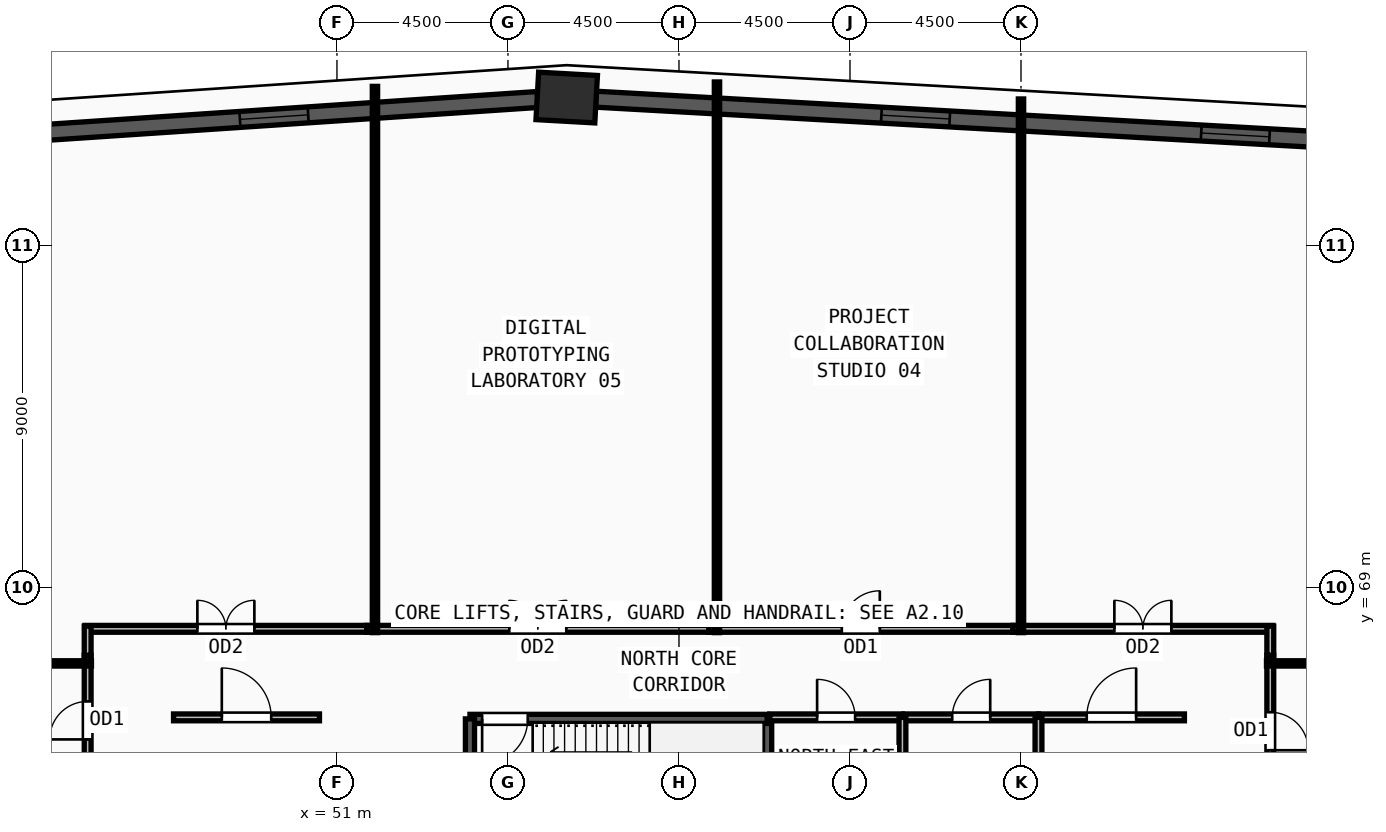
"""IFC4 building model, lengths in metres.
Left out: names, types, materials, properties, quantities, classifications, styles, units other than length and angle.
Written with IfcOpenShell. Run it as: python <this file> out.ifc"""

import sys

from ifc_helpers import new_model, si_unit, direction, frame, frame_2d, origin, origin_2d, place, context, subcontext, project, spatial, rectangle, extrude, source, transform, mapped, element, fill, save


model = new_model("IFC4")
c1 = context("Model", 3, precision=1e-05, world=origin(), true_north=direction((0.0, 1.0)))
c2 = subcontext(c1, "Body", "Model", "MODEL_VIEW")
j1 = project(units=[si_unit("LENGTHUNIT", "METRE"), si_unit("PLANEANGLEUNIT", "RADIAN")], contexts=[c1])
p1 = place(None, origin())
s1 = spatial("IfcSite", under=j1, at=p1, CompositionType="ELEMENT")
p2 = place(p1, origin())
s2 = spatial("IfcBuilding", under=s1, at=p2, CompositionType="ELEMENT")
p3 = place(p2, frame((0.0, 0.0, 51.75)))
s3 = spatial("IfcBuildingStorey", under=s2, at=p3, CompositionType="ELEMENT", Elevation=51.75)
m1 = source(origin(), c2, "Body", "SweptSolid", [
    extrude(rectangle(XDim=1.55, YDim=1.25, at=origin_2d()), origin(), (0.0, 0.0, 1.0), 3.75),
])
p4 = place(p3, frame((57.046, 81.889, 0.0), z_axis=(0.0, 0.0, 1.0), x_axis=(-0.998440764182, 0.055821504993, 0.0)))
e1 = element("IfcColumn", 1, at=p4, inside=s3, PredefinedType="COLUMN", context=c2, shape_type="MappedRepresentation", body=[
    mapped(m1, transform((0.0, 0.0, 0.0), x_axis=(1.0, 0.0, 0.0), y_axis=(0.0, 1.0, 0.0), z_axis=(0.0, 0.0, 1.0), scale=1.0)),
])
p5 = place(p3, frame((91.471, 79.966, 0.0), z_axis=(0.0, 0.0, 1.0), x_axis=(-0.998444156387, 0.055760797854, 0.0)))
e2 = element("IfcWall", 2, at=p5, inside=s3, PredefinedType="SOLIDWALL", context=c2, shape_type="SweptSolid", body=[
    extrude(rectangle(XDim=33.713, YDim=0.42, at=frame_2d((16.857, 0.0))), origin(), (0.0, 0.0, 1.0), 3.57),
])
m2 = source(origin(), c2, "Body", "SweptSolid", [
    extrude(rectangle(XDim=1.8, YDim=1.95, at=frame_2d((0.9, 0.975))), frame((0.0, 0.22, 0.0), z_axis=(0.0, -1.0, 0.0), x_axis=(1.0, 0.0, 0.0)), (0.0, 0.0, 1.0), 0.44),
])
p6 = place(p5, frame((7.528, 0.0, 0.55)))
e3 = element("IfcOpeningElement", 3, at=p6, cuts=e2, PredefinedType="OPENING", context=c2, shape_type="MappedRepresentation", body=[
    mapped(m2, transform((0.0, 0.0, 0.0), x_axis=(1.0, 0.0, 0.0), y_axis=(0.0, 1.0, 0.0), z_axis=(0.0, 0.0, 1.0), scale=1.0)),
])
p7 = place(p5, frame((15.957, 0.0, 0.55)))
e4 = element("IfcOpeningElement", 4, at=p7, cuts=e2, PredefinedType="OPENING", context=c2, shape_type="MappedRepresentation", body=[
    mapped(m2, transform((0.0, 0.0, 0.0), x_axis=(1.0, 0.0, 0.0), y_axis=(0.0, 1.0, 0.0), z_axis=(0.0, 0.0, 1.0), scale=1.0)),
])
p8 = place(p5, frame((24.385, 0.0, 0.55)))
e5 = element("IfcOpeningElement", 5, at=p8, cuts=e2, PredefinedType="OPENING", context=c2, shape_type="MappedRepresentation", body=[
    mapped(m2, transform((0.0, 0.0, 0.0), x_axis=(1.0, 0.0, 0.0), y_axis=(0.0, 1.0, 0.0), z_axis=(0.0, 0.0, 1.0), scale=1.0)),
])
p9 = place(p3, frame((56.283, 81.838, 0.0), z_axis=(0.0, 0.0, 1.0), x_axis=(-0.99776671065, -0.066795142933, 0.0)))
e6 = element("IfcWall", 6, at=p9, inside=s3, PredefinedType="SOLIDWALL", context=c2, shape_type="SweptSolid", body=[
    extrude(rectangle(XDim=27.815, YDim=0.42, at=frame_2d((13.907, 0.0))), origin(), (0.0, 0.0, 1.0), 3.57),
])
p10 = place(p9, frame((6.054, 0.0, 0.55)))
e7 = element("IfcOpeningElement", 7, at=p10, cuts=e6, PredefinedType="OPENING", context=c2, shape_type="MappedRepresentation", body=[
    mapped(m2, transform((0.0, 0.0, 0.0), x_axis=(1.0, 0.0, 0.0), y_axis=(0.0, 1.0, 0.0), z_axis=(0.0, 0.0, 1.0), scale=1.0)),
])
p11 = place(p9, frame((13.008, 0.0, 0.55)))
e8 = element("IfcOpeningElement", 8, at=p11, cuts=e6, PredefinedType="OPENING", context=c2, shape_type="MappedRepresentation", body=[
    mapped(m2, transform((0.0, 0.0, 0.0), x_axis=(1.0, 0.0, 0.0), y_axis=(0.0, 1.0, 0.0), z_axis=(0.0, 0.0, 1.0), scale=1.0)),
])
p12 = place(p9, frame((19.961, 0.0, 0.55)))
e9 = element("IfcOpeningElement", 9, at=p12, cuts=e6, PredefinedType="OPENING", context=c2, shape_type="MappedRepresentation", body=[
    mapped(m2, transform((0.0, 0.0, 0.0), x_axis=(1.0, 0.0, 0.0), y_axis=(0.0, 1.0, 0.0), z_axis=(0.0, 0.0, 1.0), scale=1.0)),
])
p13 = place(p3, frame((62.32, 62.1, 0.0), z_axis=(0.0, 0.0, 1.0), x_axis=(0.0, 1.0, 0.0)))
e10 = element("IfcWall", 10, at=p13, inside=s3, PredefinedType="SOLIDWALL", context=c2, shape_type="SweptSolid", body=[
    extrude(rectangle(XDim=3.44, YDim=0.24, at=frame_2d((1.72, 0.0))), origin(), (0.0, 0.0, 1.0), 3.57),
])
p14 = place(p3, frame((62.32, 65.54, 0.0), z_axis=(0.0, 0.0, 1.0), x_axis=(-1.0, 0.0, 0.0)))
e11 = element("IfcWall", 11, at=p14, inside=s3, PredefinedType="SOLIDWALL", context=c2, shape_type="SweptSolid", body=[
    extrude(rectangle(XDim=7.82, YDim=0.24, at=frame_2d((3.91, 0.0))), origin(), (0.0, 0.0, 1.0), 3.57),
])
m3 = source(origin(), c2, "Body", "SweptSolid", [
    extrude(rectangle(XDim=1.2, YDim=2.2, at=frame_2d((0.6, 1.1))), frame((0.0, 0.13, 0.0), z_axis=(0.0, -1.0, 0.0), x_axis=(1.0, 0.0, 0.0)), (0.0, 0.0, 1.0), 0.26),
])
p15 = place(p14, frame((6.3, 0.0, 0.0)))
e12 = element("IfcOpeningElement", 12, at=p15, cuts=e11, PredefinedType="OPENING", context=c2, shape_type="MappedRepresentation", body=[
    mapped(m3, transform((0.0, 0.0, 0.0), x_axis=(1.0, 0.0, 0.0), y_axis=(0.0, 1.0, 0.0), z_axis=(0.0, 0.0, 1.0), scale=1.0)),
])
p16 = place(p3, frame((54.5, 65.54, 0.0), z_axis=(0.0, 0.0, 1.0), x_axis=(0.0, -1.0, 0.0)))
e13 = element("IfcWall", 13, at=p16, inside=s3, PredefinedType="SOLIDWALL", context=c2, shape_type="SweptSolid", body=[
    extrude(rectangle(XDim=3.44, YDim=0.24, at=frame_2d((1.72, 0.0))), origin(), (0.0, 0.0, 1.0), 3.57),
])
p17 = place(p3, frame((62.39, 65.58, 0.0), z_axis=(0.0, 0.0, 1.0), x_axis=(1.0, 0.0, 0.0)))
e14 = element("IfcWall", 14, at=p17, inside=s3, PredefinedType="PARTITIONING", context=c2, shape_type="SweptSolid", body=[
    extrude(rectangle(XDim=3.49, YDim=0.18, at=frame_2d((1.745, 0.0))), origin(), (0.0, 0.0, 1.0), 3.57),
])
m4 = source(origin(), c2, "Body", "SweptSolid", [
    extrude(rectangle(XDim=1.0, YDim=2.2, at=frame_2d((0.5, 1.1))), frame((0.0, 0.1, 0.0), z_axis=(0.0, -1.0, 0.0), x_axis=(1.0, 0.0, 0.0)), (0.0, 0.0, 1.0), 0.2),
])
p18 = place(p17, frame((1.245, 0.0, 0.0)))
e15 = element("IfcOpeningElement", 15, at=p18, cuts=e14, PredefinedType="OPENING", context=c2, shape_type="MappedRepresentation", body=[
    mapped(m4, transform((0.0, 0.0, 0.0), x_axis=(1.0, 0.0, 0.0), y_axis=(0.0, 1.0, 0.0), z_axis=(0.0, 0.0, 1.0), scale=1.0)),
])
p19 = place(p3, frame((65.92, 65.58, 0.0), z_axis=(0.0, 0.0, 1.0), x_axis=(1.0, 0.0, 0.0)))
e16 = element("IfcWall", 16, at=p19, inside=s3, PredefinedType="PARTITIONING", context=c2, shape_type="SweptSolid", body=[
    extrude(rectangle(XDim=3.54, YDim=0.18, at=frame_2d((1.77, 0.0))), origin(), (0.0, 0.0, 1.0), 3.57),
])
p20 = place(p19, frame((1.27, 0.0, 0.0)))
e17 = element("IfcOpeningElement", 17, at=p20, cuts=e16, PredefinedType="OPENING", context=c2, shape_type="MappedRepresentation", body=[
    mapped(m4, transform((0.0, 0.0, 0.0), x_axis=(1.0, 0.0, 0.0), y_axis=(0.0, 1.0, 0.0), z_axis=(0.0, 0.0, 1.0), scale=1.0)),
])
p21 = place(p3, frame((46.7, 65.58, 0.0), z_axis=(0.0, 0.0, 1.0), x_axis=(1.0, 0.0, 0.0)))
e18 = element("IfcWall", 18, at=p21, inside=s3, PredefinedType="PARTITIONING", context=c2, shape_type="SweptSolid", body=[
    extrude(rectangle(XDim=3.84, YDim=0.18, at=frame_2d((1.92, 0.0))), origin(), (0.0, 0.0, 1.0), 3.57),
])
m5 = source(origin(), c2, "Body", "SweptSolid", [
    extrude(rectangle(XDim=1.3, YDim=2.2, at=frame_2d((0.65, 1.1))), frame((0.0, 0.1, 0.0), z_axis=(0.0, -1.0, 0.0), x_axis=(1.0, 0.0, 0.0)), (0.0, 0.0, 1.0), 0.2),
])
p22 = place(p21, frame((1.27, 0.0, 0.0)))
e19 = element("IfcOpeningElement", 19, at=p22, cuts=e18, PredefinedType="OPENING", context=c2, shape_type="MappedRepresentation", body=[
    mapped(m5, transform((0.0, 0.0, 0.0), x_axis=(1.0, 0.0, 0.0), y_axis=(0.0, 1.0, 0.0), z_axis=(0.0, 0.0, 1.0), scale=1.0)),
])
p23 = place(p3, frame((69.46, 65.58, 0.0), z_axis=(0.0, 0.0, 1.0), x_axis=(1.0, 0.0, 0.0)))
e20 = element("IfcWall", 20, at=p23, inside=s3, PredefinedType="PARTITIONING", context=c2, shape_type="SweptSolid", body=[
    extrude(rectangle(XDim=3.84, YDim=0.18, at=frame_2d((1.92, 0.0))), origin(), (0.0, 0.0, 1.0), 3.57),
])
p24 = place(p23, frame((1.27, 0.0, 0.0)))
e21 = element("IfcOpeningElement", 21, at=p24, cuts=e20, PredefinedType="OPENING", context=c2, shape_type="MappedRepresentation", body=[
    mapped(m5, transform((0.0, 0.0, 0.0), x_axis=(1.0, 0.0, 0.0), y_axis=(0.0, 1.0, 0.0), z_axis=(0.0, 0.0, 1.0), scale=1.0)),
])
p25 = place(p3, frame((75.56, 67.215, 0.0), z_axis=(0.0, 0.0, 1.0), x_axis=(0.0, -1.0, 0.0)))
e22 = element("IfcWall", 22, at=p25, inside=s3, PredefinedType="PARTITIONING", context=c2, shape_type="SweptSolid", body=[
    extrude(rectangle(XDim=4.0, YDim=0.18, at=frame_2d((2.0, 0.0))), origin(), (0.0, 0.0, 1.0), 3.57),
])
p26 = place(p25, frame((1.5, 0.0, 0.0)))
e23 = element("IfcOpeningElement", 23, at=p26, cuts=e22, PredefinedType="OPENING", context=c2, shape_type="MappedRepresentation", body=[
    mapped(m4, transform((0.0, 0.0, 0.0), x_axis=(1.0, 0.0, 0.0), y_axis=(0.0, 1.0, 0.0), z_axis=(0.0, 0.0, 1.0), scale=1.0)),
])
p27 = place(p3, frame((68.785, 67.91, 0.0), z_axis=(0.0, 0.0, 1.0), x_axis=(1.0, 0.0, 0.0)))
e24 = element("IfcWall", 24, at=p27, inside=s3, PredefinedType="PARTITIONING", context=c2, shape_type="SweptSolid", body=[
    extrude(rectangle(XDim=6.845, YDim=0.18, at=frame_2d((3.422, 0.0))), origin(), (0.0, 0.0, 1.0), 3.57),
])
m6 = source(origin(), c2, "Body", "SweptSolid", [
    extrude(rectangle(XDim=1.5, YDim=2.2, at=frame_2d((0.75, 1.1))), frame((0.0, 0.1, 0.0), z_axis=(0.0, -1.0, 0.0), x_axis=(1.0, 0.0, 0.0)), (0.0, 0.0, 1.0), 0.2),
])
p28 = place(p27, frame((2.672, 0.0, 0.0)))
e25 = element("IfcOpeningElement", 25, at=p28, cuts=e24, PredefinedType="OPENING", context=c2, shape_type="MappedRepresentation", body=[
    mapped(m6, transform((0.0, 0.0, 0.0), x_axis=(1.0, 0.0, 0.0), y_axis=(0.0, 1.0, 0.0), z_axis=(0.0, 0.0, 1.0), scale=1.0)),
])
p29 = place(p3, frame((60.785, 67.91, 0.0), z_axis=(0.0, 0.0, 1.0), x_axis=(1.0, 0.0, 0.0)))
e26 = element("IfcWall", 26, at=p29, inside=s3, PredefinedType="PARTITIONING", context=c2, shape_type="SweptSolid", body=[
    extrude(rectangle(XDim=8.0, YDim=0.18, at=frame_2d((4.0, 0.0))), origin(), (0.0, 0.0, 1.0), 3.57),
])
p30 = place(p29, frame((3.5, 0.0, 0.0)))
e27 = element("IfcOpeningElement", 27, at=p30, cuts=e26, PredefinedType="OPENING", context=c2, shape_type="MappedRepresentation", body=[
    mapped(m4, transform((0.0, 0.0, 0.0), x_axis=(1.0, 0.0, 0.0), y_axis=(0.0, 1.0, 0.0), z_axis=(0.0, 0.0, 1.0), scale=1.0)),
])
p31 = place(p3, frame((51.785, 67.91, 0.0), z_axis=(0.0, 0.0, 1.0), x_axis=(1.0, 0.0, 0.0)))
e28 = element("IfcWall", 28, at=p31, inside=s3, PredefinedType="PARTITIONING", context=c2, shape_type="SweptSolid", body=[
    extrude(rectangle(XDim=9.0, YDim=0.18, at=frame_2d((4.5, 0.0))), origin(), (0.0, 0.0, 1.0), 3.57),
])
p32 = place(p31, frame((3.75, 0.0, 0.0)))
e29 = element("IfcOpeningElement", 29, at=p32, cuts=e28, PredefinedType="OPENING", context=c2, shape_type="MappedRepresentation", body=[
    mapped(m6, transform((0.0, 0.0, 0.0), x_axis=(1.0, 0.0, 0.0), y_axis=(0.0, 1.0, 0.0), z_axis=(0.0, 0.0, 1.0), scale=1.0)),
])
p33 = place(p3, frame((44.37, 67.91, 0.0), z_axis=(0.0, 0.0, 1.0), x_axis=(1.0, 0.0, 0.0)))
e30 = element("IfcWall", 30, at=p33, inside=s3, PredefinedType="PARTITIONING", context=c2, shape_type="SweptSolid", body=[
    extrude(rectangle(XDim=7.415, YDim=0.18, at=frame_2d((3.708, 0.0))), origin(), (0.0, 0.0, 1.0), 3.57),
])
p34 = place(p33, frame((2.957, 0.0, 0.0)))
e31 = element("IfcOpeningElement", 31, at=p34, cuts=e30, PredefinedType="OPENING", context=c2, shape_type="MappedRepresentation", body=[
    mapped(m6, transform((0.0, 0.0, 0.0), x_axis=(1.0, 0.0, 0.0), y_axis=(0.0, 1.0, 0.0), z_axis=(0.0, 0.0, 1.0), scale=1.0)),
])
p35 = place(p3, frame((44.44, 63.785, 0.0), z_axis=(0.0, 0.0, 1.0), x_axis=(0.0, 1.0, 0.0)))
e32 = element("IfcWall", 32, at=p35, inside=s3, PredefinedType="PARTITIONING", context=c2, shape_type="SweptSolid", body=[
    extrude(rectangle(XDim=3.43, YDim=0.18, at=frame_2d((1.715, 0.0))), origin(), (0.0, 0.0, 1.0), 3.57),
])
p36 = place(p35, frame((1.215, 0.0, 0.0)))
e33 = element("IfcOpeningElement", 33, at=p36, cuts=e32, PredefinedType="OPENING", context=c2, shape_type="MappedRepresentation", body=[
    mapped(m4, transform((0.0, 0.0, 0.0), x_axis=(1.0, 0.0, 0.0), y_axis=(0.0, 1.0, 0.0), z_axis=(0.0, 0.0, 1.0), scale=1.0)),
])
for number, where, z_axis, x_axis in (
    (34, (65.88, 61.95, 0.0), (0.0, 0.0, 1.0), (0.0, 1.0, 0.0)),
    (35, (69.46, 61.95, 0.0), (0.0, 0.0, 1.0), (0.0, 1.0, 0.0)),
):
    element("IfcWall", number, at=place(p3, frame(where, z_axis=z_axis, x_axis=x_axis)), inside=s3, PredefinedType="PARTITIONING", context=c2, shape_type="SweptSolid", body=[
        extrude(rectangle(XDim=3.63, YDim=0.18, at=frame_2d((1.815, 0.0))), origin(), (0.0, 0.0, 1.0), 3.57),
    ])
for number, where, z_axis, x_axis in (
    (36, (75.56, 67.98, 0.0), (0.0, 0.0, 1.0), (0.0, -1.0, 0.0)),
    (37, (44.44, 67.215, 0.0), (0.0, 0.0, 1.0), (0.0, 1.0, 0.0)),
):
    element("IfcWall", number, at=place(p3, frame(where, z_axis=z_axis, x_axis=x_axis)), inside=s3, PredefinedType="PARTITIONING", context=c2, shape_type="SweptSolid", body=[
        extrude(rectangle(XDim=0.765, YDim=0.18, at=frame_2d((0.382, 0.0))), origin(), (0.0, 0.0, 1.0), 3.57),
    ])
p37 = place(p3, frame((44.54, 67.0, 0.0), z_axis=(0.0, 0.0, 1.0), x_axis=(-1.0, 0.0, 0.0)))
e38 = element("IfcWall", 38, at=p37, inside=s3, PredefinedType="PARTITIONING", context=c2, shape_type="SweptSolid", body=[
    extrude(rectangle(XDim=22.825, YDim=0.14, at=frame_2d((11.413, 0.0))), origin(), (0.0, 0.0, 1.0), 2.655),
])
p38 = place(p3, frame((75.46, 67.0, 0.0), z_axis=(0.0, 0.0, 1.0), x_axis=(1.0, 0.0, 0.0)))
e39 = element("IfcWall", 39, at=p38, inside=s3, PredefinedType="PARTITIONING", context=c2, shape_type="SweptSolid", body=[
    extrude(rectangle(XDim=22.855, YDim=0.14, at=frame_2d((11.427, 0.0))), origin(), (0.0, 0.0, 1.0), 2.655),
])
p39 = place(p3, frame((52.0, 67.81, 0.0), z_axis=(0.0, 0.0, 1.0), x_axis=(0.0, 1.0, 0.0)))
e40 = element("IfcWall", 40, at=p39, inside=s3, PredefinedType="PARTITIONING", context=c2, shape_type="SweptSolid", body=[
    extrude(rectangle(XDim=14.373, YDim=0.14, at=frame_2d((7.187, 0.0))), origin(), (0.0, 0.0, 1.0), 3.57),
])
p40 = place(p3, frame((61.0, 67.81, 0.0), z_axis=(0.0, 0.0, 1.0), x_axis=(0.0, 1.0, 0.0)))
e41 = element("IfcWall", 41, at=p40, inside=s3, PredefinedType="PARTITIONING", context=c2, shape_type="SweptSolid", body=[
    extrude(rectangle(XDim=14.489, YDim=0.14, at=frame_2d((7.245, 0.0))), origin(), (0.0, 0.0, 1.0), 3.57),
])
p41 = place(p3, frame((69.0, 67.81, 0.0), z_axis=(0.0, 0.0, 1.0), x_axis=(0.0, 1.0, 0.0)))
e42 = element("IfcWall", 42, at=p41, inside=s3, PredefinedType="PARTITIONING", context=c2, shape_type="SweptSolid", body=[
    extrude(rectangle(XDim=14.042, YDim=0.14, at=frame_2d((7.021, 0.0))), origin(), (0.0, 0.0, 1.0), 3.57),
])
m7 = source(origin(), c2, "Body", "SweptSolid", [
    extrude(rectangle(XDim=1.8, YDim=1.95, at=frame_2d((0.9, 0.975))), frame((0.0, 0.03, 0.0), z_axis=(0.0, -1.0, 0.0), x_axis=(1.0, 0.0, 0.0)), (0.0, 0.0, 1.0), 0.06),
])
p42 = place(p7, origin())
e43 = element("IfcWindow", 43, at=p42, inside=s3, PartitioningType="DOUBLE_PANEL_VERTICAL", PredefinedType="WINDOW", context=c2, shape_type="MappedRepresentation", body=[
    mapped(m7, transform((0.0, 0.0, 0.0), x_axis=(1.0, 0.0, 0.0), y_axis=(0.0, 1.0, 0.0), z_axis=(0.0, 0.0, 1.0), scale=1.0)),
])
fill(e4, e43)
p43 = place(p8, origin())
e44 = element("IfcWindow", 44, at=p43, inside=s3, PartitioningType="DOUBLE_PANEL_VERTICAL", PredefinedType="WINDOW", context=c2, shape_type="MappedRepresentation", body=[
    mapped(m7, transform((0.0, 0.0, 0.0), x_axis=(1.0, 0.0, 0.0), y_axis=(0.0, 1.0, 0.0), z_axis=(0.0, 0.0, 1.0), scale=1.0)),
])
fill(e5, e44)
p44 = place(p10, origin())
e45 = element("IfcWindow", 45, at=p44, inside=s3, PartitioningType="DOUBLE_PANEL_VERTICAL", PredefinedType="WINDOW", context=c2, shape_type="MappedRepresentation", body=[
    mapped(m7, transform((0.0, 0.0, 0.0), x_axis=(1.0, 0.0, 0.0), y_axis=(0.0, 1.0, 0.0), z_axis=(0.0, 0.0, 1.0), scale=1.0)),
])
fill(e7, e45)
m8 = source(origin(), c2, "Body", "SweptSolid", [
    extrude(rectangle(XDim=1.2, YDim=2.2, at=frame_2d((0.6, 1.1))), frame((0.0, 0.025, 0.0), z_axis=(0.0, -1.0, 0.0), x_axis=(1.0, 0.0, 0.0)), (0.0, 0.0, 1.0), 0.05),
])
p45 = place(p15, origin())
e46 = element("IfcDoor", 46, at=p45, inside=s3, OperationType="SINGLE_SWING_RIGHT", PredefinedType="DOOR", context=c2, shape_type="MappedRepresentation", body=[
    mapped(m8, transform((0.0, 0.0, 0.0), x_axis=(1.0, 0.0, 0.0), y_axis=(0.0, 1.0, 0.0), z_axis=(0.0, 0.0, 1.0), scale=1.0)),
])
fill(e12, e46)
m9 = source(origin(), c2, "Body", "SweptSolid", [
    extrude(rectangle(XDim=1.0, YDim=2.2, at=frame_2d((0.5, 1.1))), frame((0.0, 0.025, 0.0), z_axis=(0.0, -1.0, 0.0), x_axis=(1.0, 0.0, 0.0)), (0.0, 0.0, 1.0), 0.05),
])
p46 = place(p18, origin())
e47 = element("IfcDoor", 47, at=p46, inside=s3, OperationType="SINGLE_SWING_LEFT", PredefinedType="DOOR", context=c2, shape_type="MappedRepresentation", body=[
    mapped(m9, transform((0.0, 0.0, 0.0), x_axis=(1.0, 0.0, 0.0), y_axis=(0.0, 1.0, 0.0), z_axis=(0.0, 0.0, 1.0), scale=1.0)),
])
fill(e15, e47)
p47 = place(p20, origin())
e48 = element("IfcDoor", 48, at=p47, inside=s3, OperationType="SINGLE_SWING_RIGHT", PredefinedType="DOOR", context=c2, shape_type="MappedRepresentation", body=[
    mapped(m9, transform((0.0, 0.0, 0.0), x_axis=(1.0, 0.0, 0.0), y_axis=(0.0, 1.0, 0.0), z_axis=(0.0, 0.0, 1.0), scale=1.0)),
])
fill(e17, e48)
m10 = source(origin(), c2, "Body", "SweptSolid", [
    extrude(rectangle(XDim=1.3, YDim=2.2, at=frame_2d((0.65, 1.1))), frame((0.0, 0.025, 0.0), z_axis=(0.0, -1.0, 0.0), x_axis=(1.0, 0.0, 0.0)), (0.0, 0.0, 1.0), 0.05),
])
p48 = place(p22, origin())
e49 = element("IfcDoor", 49, at=p48, inside=s3, OperationType="SINGLE_SWING_LEFT", PredefinedType="DOOR", context=c2, shape_type="MappedRepresentation", body=[
    mapped(m10, transform((0.0, 0.0, 0.0), x_axis=(1.0, 0.0, 0.0), y_axis=(0.0, 1.0, 0.0), z_axis=(0.0, 0.0, 1.0), scale=1.0)),
])
fill(e19, e49)
p49 = place(p24, origin())
e50 = element("IfcDoor", 50, at=p49, inside=s3, OperationType="SINGLE_SWING_RIGHT", PredefinedType="DOOR", context=c2, shape_type="MappedRepresentation", body=[
    mapped(m10, transform((0.0, 0.0, 0.0), x_axis=(1.0, 0.0, 0.0), y_axis=(0.0, 1.0, 0.0), z_axis=(0.0, 0.0, 1.0), scale=1.0)),
])
fill(e21, e50)
p50 = place(p26, origin())
e51 = element("IfcDoor", 51, at=p50, inside=s3, OperationType="SINGLE_SWING_RIGHT", PredefinedType="DOOR", context=c2, shape_type="MappedRepresentation", body=[
    mapped(m9, transform((0.0, 0.0, 0.0), x_axis=(1.0, 0.0, 0.0), y_axis=(0.0, 1.0, 0.0), z_axis=(0.0, 0.0, 1.0), scale=1.0)),
])
fill(e23, e51)
m11 = source(origin(), c2, "Body", "SweptSolid", [
    extrude(rectangle(XDim=1.5, YDim=2.2, at=frame_2d((0.75, 1.1))), frame((0.0, 0.025, 0.0), z_axis=(0.0, -1.0, 0.0), x_axis=(1.0, 0.0, 0.0)), (0.0, 0.0, 1.0), 0.05),
])
p51 = place(p28, origin())
e52 = element("IfcDoor", 52, at=p51, inside=s3, OperationType="DOUBLE_DOOR_SINGLE_SWING", PredefinedType="DOOR", context=c2, shape_type="MappedRepresentation", body=[
    mapped(m11, transform((0.0, 0.0, 0.0), x_axis=(1.0, 0.0, 0.0), y_axis=(0.0, 1.0, 0.0), z_axis=(0.0, 0.0, 1.0), scale=1.0)),
])
fill(e25, e52)
p52 = place(p30, origin())
e53 = element("IfcDoor", 53, at=p52, inside=s3, OperationType="SINGLE_SWING_RIGHT", PredefinedType="DOOR", context=c2, shape_type="MappedRepresentation", body=[
    mapped(m9, transform((0.0, 0.0, 0.0), x_axis=(1.0, 0.0, 0.0), y_axis=(0.0, 1.0, 0.0), z_axis=(0.0, 0.0, 1.0), scale=1.0)),
])
fill(e27, e53)
p53 = place(p32, origin())
e54 = element("IfcDoor", 54, at=p53, inside=s3, OperationType="DOUBLE_DOOR_SINGLE_SWING", PredefinedType="DOOR", context=c2, shape_type="MappedRepresentation", body=[
    mapped(m11, transform((0.0, 0.0, 0.0), x_axis=(1.0, 0.0, 0.0), y_axis=(0.0, 1.0, 0.0), z_axis=(0.0, 0.0, 1.0), scale=1.0)),
])
fill(e29, e54)
p54 = place(p34, origin())
e55 = element("IfcDoor", 55, at=p54, inside=s3, OperationType="DOUBLE_DOOR_SINGLE_SWING", PredefinedType="DOOR", context=c2, shape_type="MappedRepresentation", body=[
    mapped(m11, transform((0.0, 0.0, 0.0), x_axis=(1.0, 0.0, 0.0), y_axis=(0.0, 1.0, 0.0), z_axis=(0.0, 0.0, 1.0), scale=1.0)),
])
fill(e31, e55)
p55 = place(p36, origin())
e56 = element("IfcDoor", 56, at=p55, inside=s3, OperationType="SINGLE_SWING_LEFT", PredefinedType="DOOR", context=c2, shape_type="MappedRepresentation", body=[
    mapped(m9, transform((0.0, 0.0, 0.0), x_axis=(1.0, 0.0, 0.0), y_axis=(0.0, 1.0, 0.0), z_axis=(0.0, 0.0, 1.0), scale=1.0)),
])
fill(e33, e56)
save(model, sys.argv[1])
